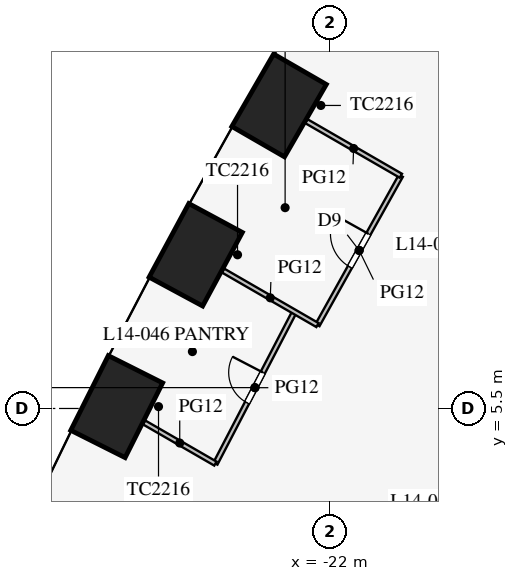
"""IFC4 building model, lengths in metres.
Left out: names, types, materials, properties, quantities, classifications, styles, units other than length and angle.
Written with IfcOpenShell. Run it as: python <this file> out.ifc"""

import sys

from ifc_helpers import new_model, si_unit, direction, frame, frame_2d, origin, origin_2d, place, context, subcontext, project, spatial, rectangle, extrude, element, fill, save


model = new_model("IFC4")
c1 = context("Model", 3, precision=1e-05, world=origin(), true_north=direction((0.0, 1.0)))
c2 = subcontext(c1, "Body", "Model", "MODEL_VIEW")
j1 = project(units=[si_unit("LENGTHUNIT", "METRE"), si_unit("PLANEANGLEUNIT", "RADIAN")], contexts=[c1])
p1 = place(None, origin())
s1 = spatial("IfcSite", under=j1, at=p1, CompositionType="ELEMENT")
p2 = place(p1, origin())
s2 = spatial("IfcBuilding", under=s1, at=p2, CompositionType="ELEMENT")
p3 = place(p2, frame((0.0, 0.0, 62.7)))
s3 = spatial("IfcBuildingStorey", under=s2, at=p3, CompositionType="ELEMENT", Elevation=62.7)
for number, where, z_axis, x_axis in (
    (1, (-23.338, 13.474, 0.0), (0.0, 0.0, 1.0), (-0.5, -0.866, 0.0)),
    (2, (-25.531, 9.544, 0.0), (0.0, 0.0, 1.0), (-0.475, -0.88, 0.0)),
    (3, (-27.611, 5.549, 0.0), (0.0, 0.0, 1.0), (-0.449, -0.894, 0.0)),
):
    element("IfcColumn", number, at=place(p3, frame(where, z_axis=z_axis, x_axis=x_axis)), inside=s3, PredefinedType="COLUMN", context=c2, shape_type="SweptSolid", body=[
        extrude(rectangle(XDim=2.2, YDim=1.6, at=origin_2d()), origin(), (0.0, 0.0, 1.0), 4.2),
    ])
p4 = place(p3, frame((-20.134, 11.624, 0.0), z_axis=(0.0, 0.0, 1.0), x_axis=(-0.487373854787, -0.873193406795, 0.0)))
e4 = element("IfcWall", 4, at=p4, inside=s3, PredefinedType="PARTITIONING", context=c2, shape_type="SweptSolid", body=[
    extrude(rectangle(XDim=4.5, YDim=0.12, at=frame_2d((2.25, 0.0))), origin(), (0.0, 0.0, 1.0), 2.9),
])
p5 = place(p4, frame((1.75, 0.0, 0.15)))
e5 = element("IfcOpeningElement", 5, at=p5, cuts=e4, PredefinedType="OPENING", context=c2, shape_type="SweptSolid", body=[
    extrude(rectangle(XDim=1.0, YDim=2.1, at=frame_2d((0.5, 1.05))), frame((0.0, 0.07, 0.0), z_axis=(0.0, -1.0, 0.0), x_axis=(1.0, 0.0, 0.0)), (0.0, 0.0, 1.0), 0.14),
])
p6 = place(p3, frame((-22.934, 8.045, 0.0), z_axis=(0.0, 0.0, 1.0), x_axis=(-0.461852697957, -0.886956642339, 0.0)))
e6 = element("IfcWall", 6, at=p6, inside=s3, PredefinedType="PARTITIONING", context=c2, shape_type="SweptSolid", body=[
    extrude(rectangle(XDim=4.504, YDim=0.12, at=frame_2d((2.252, 0.0))), origin(), (0.0, 0.0, 1.0), 2.9),
])
p7 = place(p6, frame((1.8, 0.0, 0.15)))
e7 = element("IfcOpeningElement", 7, at=p7, cuts=e6, PredefinedType="OPENING", context=c2, shape_type="SweptSolid", body=[
    extrude(rectangle(XDim=0.9, YDim=2.1, at=frame_2d((0.45, 1.05))), frame((0.0, 0.07, 0.0), z_axis=(0.0, -1.0, 0.0), x_axis=(1.0, 0.0, 0.0)), (0.0, 0.0, 1.0), 0.14),
])
p8 = place(p3, frame((-20.134, 11.624, 0.0), z_axis=(0.0, 0.0, 1.0), x_axis=(-0.866004249561, 0.500036638401, 0.0)))
e8 = element("IfcWall", 8, at=p8, inside=s3, PredefinedType="PARTITIONING", context=c2, shape_type="SweptSolid", body=[
    extrude(rectangle(XDim=2.87, YDim=0.12, at=frame_2d((1.435, 0.0))), origin(), (0.0, 0.0, 1.0), 2.8),
])
p9 = place(p3, frame((-22.327, 7.695, 0.0), z_axis=(0.0, 0.0, 1.0), x_axis=(-0.866035389965, 0.499982703029, 0.0)))
e9 = element("IfcWall", 9, at=p9, inside=s3, PredefinedType="PARTITIONING", context=c2, shape_type="SweptSolid", body=[
    extrude(rectangle(XDim=2.869, YDim=0.12, at=frame_2d((1.435, 0.0))), origin(), (0.0, 0.0, 1.0), 2.8),
])
p10 = place(p3, frame((-25.014, 4.05, 0.0), z_axis=(0.0, 0.0, 1.0), x_axis=(-0.86605802883, 0.499943487506, 0.0)))
e10 = element("IfcWall", 10, at=p10, inside=s3, PredefinedType="PARTITIONING", context=c2, shape_type="SweptSolid", body=[
    extrude(rectangle(XDim=2.167, YDim=0.12, at=frame_2d((1.083, 0.0))), origin(), (0.0, 0.0, 1.0), 2.8),
])
p11 = place(p5, frame((1.0, 0.0, 0.0), z_axis=(0.0, 0.0, 1.0), x_axis=(-1.0, 0.0, 0.0)))
e11 = element("IfcDoor", 11, at=p11, inside=s3, OperationType="SINGLE_SWING_RIGHT", PredefinedType="DOOR", context=c2, shape_type="SweptSolid", body=[
    extrude(rectangle(XDim=1.0, YDim=2.1, at=frame_2d((0.5, 1.05))), frame((0.0, 0.025, 0.0), z_axis=(0.0, -1.0, 0.0), x_axis=(1.0, 0.0, 0.0)), (0.0, 0.0, 1.0), 0.05),
])
fill(e5, e11)
p12 = place(p7, frame((0.9, 0.0, 0.0), z_axis=(0.0, 0.0, 1.0), x_axis=(-1.0, 0.0, 0.0)))
e12 = element("IfcDoor", 12, at=p12, inside=s3, OperationType="SINGLE_SWING_RIGHT", PredefinedType="DOOR", context=c2, shape_type="SweptSolid", body=[
    extrude(rectangle(XDim=0.9, YDim=2.1, at=frame_2d((0.45, 1.05))), frame((0.0, 0.025, 0.0), z_axis=(0.0, -1.0, 0.0), x_axis=(1.0, 0.0, 0.0)), (0.0, 0.0, 1.0), 0.05),
])
fill(e7, e12)
save(model, sys.argv[1])
